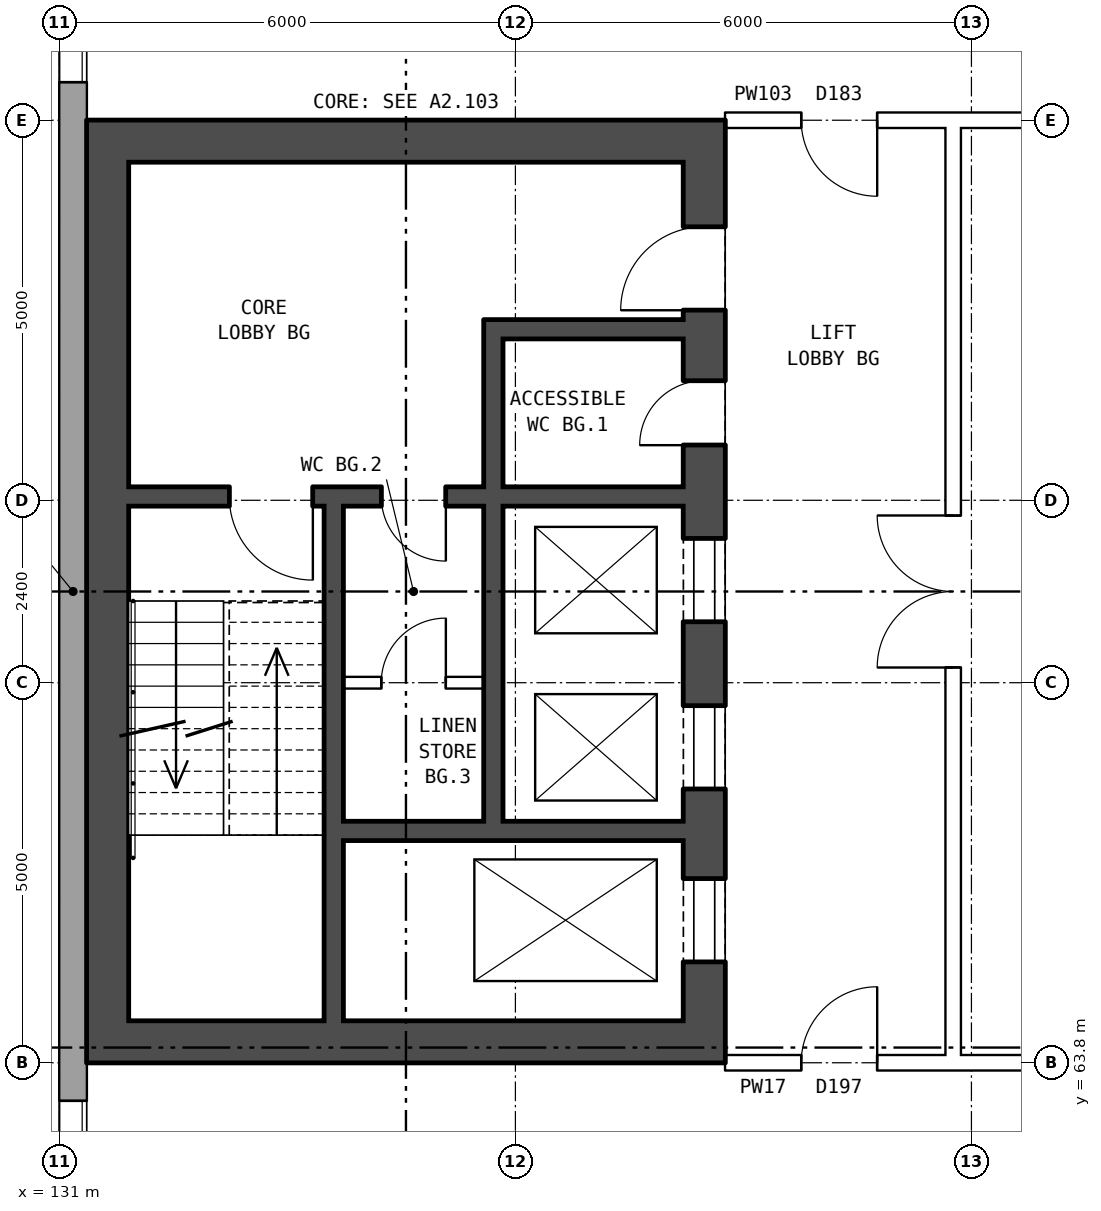
"""IFC4 building model, lengths in metres.
Left out: names, types, materials, properties, quantities, classifications, styles, units other than length and angle.
Written with IfcOpenShell. Run it as: python <this file> out.ifc"""

import sys

from ifc_helpers import new_model, si_unit, direction, frame, frame_2d, origin, place, context, subcontext, project, spatial, rectangle, extrude, element, fill, save


model = new_model("IFC4")
c1 = context("Model", 3, precision=1e-05, world=origin(), true_north=direction((0.0, 1.0)))
c2 = subcontext(c1, "Body", "Model", "MODEL_VIEW")
j1 = project(units=[si_unit("LENGTHUNIT", "METRE"), si_unit("PLANEANGLEUNIT", "RADIAN")], contexts=[c1])
p1 = place(None, origin())
s1 = spatial("IfcSite", under=j1, at=p1, CompositionType="ELEMENT")
p2 = place(p1, origin())
s2 = spatial("IfcBuilding", under=s1, at=p2, CompositionType="ELEMENT")
p3 = place(p2, frame((0.0, 0.0, 119.5)))
s3 = spatial("IfcBuildingStorey", under=s2, at=p3, CompositionType="ELEMENT", Elevation=119.5)
p4 = place(p3, frame((131.18, 82.925, 0.0), z_axis=(0.0, 0.0, 1.0), x_axis=(0.0, -1.0, 0.0)))
e1 = element("IfcWall", 1, at=p4, inside=s3, PredefinedType="STANDARD", context=c2, shape_type="SweptSolid", body=[
    extrude(rectangle(XDim=25.851, YDim=0.36, at=frame_2d((12.925, 0.0))), origin(), (0.0, 0.0, 1.0), 3.6),
])
p5 = place(p4, frame((1.625, 0.0, 0.8)))
e2 = element("IfcOpeningElement", 2, at=p5, cuts=e1, PredefinedType="OPENING", context=c2, shape_type="SweptSolid", body=[
    extrude(rectangle(XDim=1.6, YDim=1.8, at=frame_2d((0.8, 0.9))), frame((0.0, 0.19, 0.0), z_axis=(0.0, -1.0, 0.0), x_axis=(1.0, 0.0, 0.0)), (0.0, 0.0, 1.0), 0.38),
])
p6 = place(p4, frame((4.625, 0.0, 0.8)))
e3 = element("IfcOpeningElement", 3, at=p6, cuts=e1, PredefinedType="OPENING", context=c2, shape_type="SweptSolid", body=[
    extrude(rectangle(XDim=1.6, YDim=1.8, at=frame_2d((0.8, 0.9))), frame((0.0, 0.19, 0.0), z_axis=(0.0, -1.0, 0.0), x_axis=(1.0, 0.0, 0.0)), (0.0, 0.0, 1.0), 0.38),
])
p7 = place(p4, frame((19.625, 0.0, 0.8)))
e4 = element("IfcOpeningElement", 4, at=p7, cuts=e1, PredefinedType="OPENING", context=c2, shape_type="SweptSolid", body=[
    extrude(rectangle(XDim=1.6, YDim=1.8, at=frame_2d((0.8, 0.9))), frame((0.0, 0.19, 0.0), z_axis=(0.0, -1.0, 0.0), x_axis=(1.0, 0.0, 0.0)), (0.0, 0.0, 1.0), 0.38),
])
p8 = place(p4, frame((22.625, 0.0, 0.8)))
e5 = element("IfcOpeningElement", 5, at=p8, cuts=e1, PredefinedType="OPENING", context=c2, shape_type="SweptSolid", body=[
    extrude(rectangle(XDim=1.6, YDim=1.8, at=frame_2d((0.8, 0.9))), frame((0.0, 0.19, 0.0), z_axis=(0.0, -1.0, 0.0), x_axis=(1.0, 0.0, 0.0)), (0.0, 0.0, 1.0), 0.38),
])
p9 = place(p3, frame((139.485, 63.8, 0.0), z_axis=(0.0, 0.0, 1.0), x_axis=(0.0, 1.0, 0.0)))
e6 = element("IfcWall", 6, at=p9, inside=s3, PredefinedType="SHEAR", context=c2, shape_type="SweptSolid", body=[
    extrude(rectangle(XDim=12.4, YDim=0.55, at=frame_2d((6.2, 0.0))), origin(), (0.0, 0.0, 1.0), 3.6),
])
p10 = place(p9, frame((1.325, 0.0, 0.0)))
e7 = element("IfcOpeningElement", 7, at=p10, cuts=e6, PredefinedType="OPENING", context=c2, shape_type="SweptSolid", body=[
    extrude(rectangle(XDim=1.1, YDim=2.1, at=frame_2d((0.55, 1.05))), frame((0.0, 0.285, 0.0), z_axis=(0.0, -1.0, 0.0), x_axis=(1.0, 0.0, 0.0)), (0.0, 0.0, 1.0), 0.57),
])
p11 = place(p9, frame((3.6, 0.0, 0.0)))
e8 = element("IfcOpeningElement", 8, at=p11, cuts=e6, PredefinedType="OPENING", context=c2, shape_type="SweptSolid", body=[
    extrude(rectangle(XDim=1.1, YDim=2.1, at=frame_2d((0.55, 1.05))), frame((0.0, 0.285, 0.0), z_axis=(0.0, -1.0, 0.0), x_axis=(1.0, 0.0, 0.0)), (0.0, 0.0, 1.0), 0.57),
])
p12 = place(p9, frame((5.8, 0.0, 0.0)))
e9 = element("IfcOpeningElement", 9, at=p12, cuts=e6, PredefinedType="OPENING", context=c2, shape_type="SweptSolid", body=[
    extrude(rectangle(XDim=1.1, YDim=2.1, at=frame_2d((0.55, 1.05))), frame((0.0, 0.285, 0.0), z_axis=(0.0, -1.0, 0.0), x_axis=(1.0, 0.0, 0.0)), (0.0, 0.0, 1.0), 0.57),
])
p13 = place(p9, frame((9.9, 0.0, 0.0)))
e10 = element("IfcOpeningElement", 10, at=p13, cuts=e6, PredefinedType="OPENING", context=c2, shape_type="SweptSolid", body=[
    extrude(rectangle(XDim=1.1, YDim=2.1, at=frame_2d((0.55, 1.05))), frame((0.0, 0.285, 0.0), z_axis=(0.0, -1.0, 0.0), x_axis=(1.0, 0.0, 0.0)), (0.0, 0.0, 1.0), 0.57),
])
p14 = place(p9, frame((8.125, 0.0, 0.0)))
e11 = element("IfcOpeningElement", 11, at=p14, cuts=e6, PredefinedType="OPENING", context=c2, shape_type="SweptSolid", body=[
    extrude(rectangle(XDim=0.85, YDim=2.1, at=frame_2d((0.425, 1.05))), frame((0.0, 0.285, 0.0), z_axis=(0.0, -1.0, 0.0), x_axis=(1.0, 0.0, 0.0)), (0.0, 0.0, 1.0), 0.57),
])
p15 = place(p3, frame((131.635, 63.8, 0.0), z_axis=(0.0, 0.0, 1.0), x_axis=(0.0, 1.0, 0.0)))
e12 = element("IfcWall", 12, at=p15, inside=s3, PredefinedType="SHEAR", context=c2, shape_type="SweptSolid", body=[
    extrude(rectangle(XDim=12.4, YDim=0.55, at=frame_2d((6.2, 0.0))), origin(), (0.0, 0.0, 1.0), 3.6),
])
for number, where, z_axis, x_axis in (
    (13, (139.21, 64.075, 0.0), (0.0, 0.0, 1.0), (-1.0, 0.0, 0.0)),
    (14, (139.21, 75.925, 0.0), (0.0, 0.0, 1.0), (-1.0, 0.0, 0.0)),
):
    element("IfcWall", number, at=place(p3, frame(where, z_axis=z_axis, x_axis=x_axis)), inside=s3, PredefinedType="SHEAR", context=c2, shape_type="SweptSolid", body=[
        extrude(rectangle(XDim=7.3, YDim=0.55, at=frame_2d((3.65, 0.0))), origin(), (0.0, 0.0, 1.0), 3.6),
    ])
p16 = place(p3, frame((139.21, 66.85, 0.0), z_axis=(0.0, 0.0, 1.0), x_axis=(-1.0, 0.0, 0.0)))
e15 = element("IfcWall", 15, at=p16, inside=s3, PredefinedType="SHEAR", context=c2, shape_type="SweptSolid", body=[
    extrude(rectangle(XDim=4.475, YDim=0.25, at=frame_2d((2.237, 0.0))), origin(), (0.0, 0.0, 1.0), 3.6),
])
p17 = place(p3, frame((136.585, 68.8, 0.0), z_axis=(0.0, 0.0, 1.0), x_axis=(-1.0, 0.0, 0.0)))
e16 = element("IfcWall", 16, at=p17, inside=s3, PredefinedType="PARTITIONING", context=c2, shape_type="SweptSolid", body=[
    extrude(rectangle(XDim=1.85, YDim=0.15, at=frame_2d((0.925, 0.0))), origin(), (0.0, 0.0, 1.0), 3.6),
])
p18 = place(p17, frame((0.5, 0.0, 0.0)))
e17 = element("IfcOpeningElement", 17, at=p18, cuts=e16, PredefinedType="OPENING", context=c2, shape_type="SweptSolid", body=[
    extrude(rectangle(XDim=0.85, YDim=2.1, at=frame_2d((0.425, 1.05))), frame((0.0, 0.085, 0.0), z_axis=(0.0, -1.0, 0.0), x_axis=(1.0, 0.0, 0.0)), (0.0, 0.0, 1.0), 0.17),
])
p19 = place(p3, frame((139.21, 71.25, 0.0), z_axis=(0.0, 0.0, 1.0), x_axis=(-1.0, 0.0, 0.0)))
e18 = element("IfcWall", 18, at=p19, inside=s3, PredefinedType="SHEAR", context=c2, shape_type="SweptSolid", body=[
    extrude(rectangle(XDim=7.3, YDim=0.25, at=frame_2d((3.65, 0.0))), origin(), (0.0, 0.0, 1.0), 3.6),
])
p20 = place(p19, frame((4.875, 0.0, 0.0)))
e19 = element("IfcOpeningElement", 19, at=p20, cuts=e18, PredefinedType="OPENING", context=c2, shape_type="SweptSolid", body=[
    extrude(rectangle(XDim=1.1, YDim=2.1, at=frame_2d((0.55, 1.05))), frame((0.0, 0.135, 0.0), z_axis=(0.0, -1.0, 0.0), x_axis=(1.0, 0.0, 0.0)), (0.0, 0.0, 1.0), 0.27),
])
p21 = place(p19, frame((3.125, 0.0, 0.0)))
e20 = element("IfcOpeningElement", 20, at=p21, cuts=e18, PredefinedType="OPENING", context=c2, shape_type="SweptSolid", body=[
    extrude(rectangle(XDim=0.85, YDim=2.1, at=frame_2d((0.425, 1.05))), frame((0.0, 0.135, 0.0), z_axis=(0.0, -1.0, 0.0), x_axis=(1.0, 0.0, 0.0)), (0.0, 0.0, 1.0), 0.27),
])
p22 = place(p3, frame((139.21, 73.45, 0.0), z_axis=(0.0, 0.0, 1.0), x_axis=(-1.0, 0.0, 0.0)))
e21 = element("IfcWall", 21, at=p22, inside=s3, PredefinedType="SHEAR", context=c2, shape_type="SweptSolid", body=[
    extrude(rectangle(XDim=2.375, YDim=0.25, at=frame_2d((1.188, 0.0))), origin(), (0.0, 0.0, 1.0), 3.6),
])
p23 = place(p3, frame((136.71, 66.975, 0.0), z_axis=(0.0, 0.0, 1.0), x_axis=(0.0, 1.0, 0.0)))
e22 = element("IfcWall", 22, at=p23, inside=s3, PredefinedType="SHEAR", context=c2, shape_type="SweptSolid", body=[
    extrude(rectangle(XDim=4.15, YDim=0.25, at=frame_2d((2.075, 0.0))), origin(), (0.0, 0.0, 1.0), 3.6),
])
p24 = place(p3, frame((136.71, 71.375, 0.0), z_axis=(0.0, 0.0, 1.0), x_axis=(0.0, 1.0, 0.0)))
e23 = element("IfcWall", 23, at=p24, inside=s3, PredefinedType="SHEAR", context=c2, shape_type="SweptSolid", body=[
    extrude(rectangle(XDim=2.2, YDim=0.25, at=frame_2d((1.1, 0.0))), origin(), (0.0, 0.0, 1.0), 3.6),
])
p25 = place(p3, frame((134.61, 64.35, 0.0), z_axis=(0.0, 0.0, 1.0), x_axis=(0.0, 1.0, 0.0)))
e24 = element("IfcWall", 24, at=p25, inside=s3, PredefinedType="SHEAR", context=c2, shape_type="SweptSolid", body=[
    extrude(rectangle(XDim=6.775, YDim=0.25, at=frame_2d((3.387, 0.0))), origin(), (0.0, 0.0, 1.0), 3.6),
])
p26 = place(p3, frame((142.76, 63.9, 0.0), z_axis=(0.0, 0.0, 1.0), x_axis=(0.0, 1.0, 0.0)))
e25 = element("IfcWall", 25, at=p26, inside=s3, PredefinedType="PARTITIONING", context=c2, shape_type="SweptSolid", body=[
    extrude(rectangle(XDim=12.2, YDim=0.2, at=frame_2d((6.1, 0.0))), origin(), (0.0, 0.0, 1.0), 3.6),
])
p27 = place(p26, frame((5.1, 0.0, 0.0)))
e26 = element("IfcOpeningElement", 26, at=p27, cuts=e25, PredefinedType="OPENING", context=c2, shape_type="SweptSolid", body=[
    extrude(rectangle(XDim=2.0, YDim=2.1, at=frame_2d((1.0, 1.05))), frame((0.0, 0.11, 0.0), z_axis=(0.0, -1.0, 0.0), x_axis=(1.0, 0.0, 0.0)), (0.0, 0.0, 1.0), 0.22),
])
p28 = place(p3, frame((142.76, 63.8, 0.0), z_axis=(0.0, 0.0, 1.0), x_axis=(1.0, 0.0, 0.0)))
e27 = element("IfcWall", 27, at=p28, inside=s3, PredefinedType="PARTITIONING", context=c2, shape_type="SweptSolid", body=[
    extrude(rectangle(XDim=14.48, YDim=0.2, at=frame_2d((7.24, 0.0))), origin(), (0.0, 0.0, 1.0), 3.6),
])
p29 = place(p28, frame((6.34, 0.0, 0.0)))
e28 = element("IfcOpeningElement", 28, at=p29, cuts=e27, PredefinedType="OPENING", context=c2, shape_type="SweptSolid", body=[
    extrude(rectangle(XDim=1.8, YDim=2.1, at=frame_2d((0.9, 1.05))), frame((0.0, 0.11, 0.0), z_axis=(0.0, -1.0, 0.0), x_axis=(1.0, 0.0, 0.0)), (0.0, 0.0, 1.0), 0.22),
])
p30 = place(p3, frame((139.76, 63.8, 0.0), z_axis=(0.0, 0.0, 1.0), x_axis=(1.0, 0.0, 0.0)))
e29 = element("IfcWall", 29, at=p30, inside=s3, PredefinedType="PARTITIONING", context=c2, shape_type="SweptSolid", body=[
    extrude(rectangle(XDim=3.0, YDim=0.2, at=frame_2d((1.5, 0.0))), origin(), (0.0, 0.0, 1.0), 3.6),
])
p31 = place(p30, frame((1.0, 0.0, 0.0)))
e30 = element("IfcOpeningElement", 30, at=p31, cuts=e29, PredefinedType="OPENING", context=c2, shape_type="SweptSolid", body=[
    extrude(rectangle(XDim=1.0, YDim=2.1, at=frame_2d((0.5, 1.05))), frame((0.0, 0.11, 0.0), z_axis=(0.0, -1.0, 0.0), x_axis=(1.0, 0.0, 0.0)), (0.0, 0.0, 1.0), 0.22),
])
p32 = place(p3, frame((142.76, 76.2, 0.0), z_axis=(0.0, 0.0, 1.0), x_axis=(1.0, 0.0, 0.0)))
e31 = element("IfcWall", 31, at=p32, inside=s3, PredefinedType="PARTITIONING", context=c2, shape_type="SweptSolid", body=[
    extrude(rectangle(XDim=14.48, YDim=0.2, at=frame_2d((7.24, 0.0))), origin(), (0.0, 0.0, 1.0), 3.6),
])
p33 = place(p32, frame((6.34, 0.0, 0.0)))
e32 = element("IfcOpeningElement", 32, at=p33, cuts=e31, PredefinedType="OPENING", context=c2, shape_type="SweptSolid", body=[
    extrude(rectangle(XDim=1.8, YDim=2.1, at=frame_2d((0.9, 1.05))), frame((0.0, 0.11, 0.0), z_axis=(0.0, -1.0, 0.0), x_axis=(1.0, 0.0, 0.0)), (0.0, 0.0, 1.0), 0.22),
])
p34 = place(p3, frame((139.76, 76.2, 0.0), z_axis=(0.0, 0.0, 1.0), x_axis=(1.0, 0.0, 0.0)))
e33 = element("IfcWall", 33, at=p34, inside=s3, PredefinedType="PARTITIONING", context=c2, shape_type="SweptSolid", body=[
    extrude(rectangle(XDim=3.0, YDim=0.2, at=frame_2d((1.5, 0.0))), origin(), (0.0, 0.0, 1.0), 3.6),
])
p35 = place(p34, frame((1.0, 0.0, 0.0)))
e34 = element("IfcOpeningElement", 34, at=p35, cuts=e33, PredefinedType="OPENING", context=c2, shape_type="SweptSolid", body=[
    extrude(rectangle(XDim=1.0, YDim=2.1, at=frame_2d((0.5, 1.05))), frame((0.0, 0.11, 0.0), z_axis=(0.0, -1.0, 0.0), x_axis=(1.0, 0.0, 0.0)), (0.0, 0.0, 1.0), 0.22),
])
p36 = place(p6, origin())
e35 = element("IfcWindow", 35, at=p36, inside=s3, PartitioningType="SINGLE_PANEL", PredefinedType="WINDOW", context=c2, shape_type="SweptSolid", body=[
    extrude(rectangle(XDim=1.6, YDim=1.8, at=frame_2d((0.8, 0.9))), frame((0.0, 0.15, 0.0), z_axis=(0.0, -1.0, 0.0), x_axis=(1.0, 0.0, 0.0)), (0.0, 0.0, 1.0), 0.06),
])
fill(e3, e35)
p37 = place(p7, origin())
e36 = element("IfcWindow", 36, at=p37, inside=s3, PartitioningType="SINGLE_PANEL", PredefinedType="WINDOW", context=c2, shape_type="SweptSolid", body=[
    extrude(rectangle(XDim=1.6, YDim=1.8, at=frame_2d((0.8, 0.9))), frame((0.0, 0.15, 0.0), z_axis=(0.0, -1.0, 0.0), x_axis=(1.0, 0.0, 0.0)), (0.0, 0.0, 1.0), 0.06),
])
fill(e4, e36)
p38 = place(p10, origin())
e37 = element("IfcDoor", 37, at=p38, inside=s3, OperationType="DOUBLE_DOOR_SLIDING", PredefinedType="DOOR", context=c2, shape_type="SweptSolid", body=[
    extrude(rectangle(XDim=1.1, YDim=2.1, at=frame_2d((0.55, 1.05))), frame((0.0, 0.26, 0.0), z_axis=(0.0, -1.0, 0.0), x_axis=(1.0, 0.0, 0.0)), (0.0, 0.0, 1.0), 0.05),
])
fill(e7, e37)
p39 = place(p11, origin())
e38 = element("IfcDoor", 38, at=p39, inside=s3, OperationType="DOUBLE_DOOR_SLIDING", PredefinedType="DOOR", context=c2, shape_type="SweptSolid", body=[
    extrude(rectangle(XDim=1.1, YDim=2.1, at=frame_2d((0.55, 1.05))), frame((0.0, 0.26, 0.0), z_axis=(0.0, -1.0, 0.0), x_axis=(1.0, 0.0, 0.0)), (0.0, 0.0, 1.0), 0.05),
])
fill(e8, e38)
p40 = place(p12, origin())
e39 = element("IfcDoor", 39, at=p40, inside=s3, OperationType="DOUBLE_DOOR_SLIDING", PredefinedType="DOOR", context=c2, shape_type="SweptSolid", body=[
    extrude(rectangle(XDim=1.1, YDim=2.1, at=frame_2d((0.55, 1.05))), frame((0.0, 0.26, 0.0), z_axis=(0.0, -1.0, 0.0), x_axis=(1.0, 0.0, 0.0)), (0.0, 0.0, 1.0), 0.05),
])
fill(e9, e39)
p41 = place(p13, origin())
e40 = element("IfcDoor", 40, at=p41, inside=s3, OperationType="SINGLE_SWING_LEFT", PredefinedType="DOOR", context=c2, shape_type="SweptSolid", body=[
    extrude(rectangle(XDim=1.1, YDim=2.1, at=frame_2d((0.55, 1.05))), frame((0.0, 0.26, 0.0), z_axis=(0.0, -1.0, 0.0), x_axis=(1.0, 0.0, 0.0)), (0.0, 0.0, 1.0), 0.05),
])
fill(e10, e40)
p42 = place(p20, origin())
e41 = element("IfcDoor", 41, at=p42, inside=s3, OperationType="SINGLE_SWING_LEFT", PredefinedType="DOOR", context=c2, shape_type="SweptSolid", body=[
    extrude(rectangle(XDim=1.1, YDim=2.1, at=frame_2d((0.55, 1.05))), frame((0.0, 0.025, 0.0), z_axis=(0.0, -1.0, 0.0), x_axis=(1.0, 0.0, 0.0)), (0.0, 0.0, 1.0), 0.05),
])
fill(e19, e41)
p43 = place(p14, origin())
e42 = element("IfcDoor", 42, at=p43, inside=s3, OperationType="SINGLE_SWING_LEFT", PredefinedType="DOOR", context=c2, shape_type="SweptSolid", body=[
    extrude(rectangle(XDim=0.85, YDim=2.1, at=frame_2d((0.425, 1.05))), frame((0.0, 0.26, 0.0), z_axis=(0.0, -1.0, 0.0), x_axis=(1.0, 0.0, 0.0)), (0.0, 0.0, 1.0), 0.05),
])
fill(e11, e42)
p44 = place(p21, origin())
e43 = element("IfcDoor", 43, at=p44, inside=s3, OperationType="SINGLE_SWING_LEFT", PredefinedType="DOOR", context=c2, shape_type="SweptSolid", body=[
    extrude(rectangle(XDim=0.85, YDim=2.1, at=frame_2d((0.425, 1.05))), frame((0.0, 0.025, 0.0), z_axis=(0.0, -1.0, 0.0), x_axis=(1.0, 0.0, 0.0)), (0.0, 0.0, 1.0), 0.05),
])
fill(e20, e43)
p45 = place(p18, frame((0.85, 0.0, 0.0), z_axis=(0.0, 0.0, 1.0), x_axis=(-1.0, 0.0, 0.0)))
e44 = element("IfcDoor", 44, at=p45, inside=s3, OperationType="SINGLE_SWING_RIGHT", PredefinedType="DOOR", context=c2, shape_type="SweptSolid", body=[
    extrude(rectangle(XDim=0.85, YDim=2.1, at=frame_2d((0.425, 1.05))), frame((0.0, 0.025, 0.0), z_axis=(0.0, -1.0, 0.0), x_axis=(1.0, 0.0, 0.0)), (0.0, 0.0, 1.0), 0.05),
])
fill(e17, e44)
p46 = place(p27, origin())
e45 = element("IfcDoor", 45, at=p46, inside=s3, OperationType="DOUBLE_DOOR_SINGLE_SWING", PredefinedType="DOOR", context=c2, shape_type="SweptSolid", body=[
    extrude(rectangle(XDim=2.0, YDim=2.1, at=frame_2d((1.0, 1.05))), frame((0.0, 0.025, 0.0), z_axis=(0.0, -1.0, 0.0), x_axis=(1.0, 0.0, 0.0)), (0.0, 0.0, 1.0), 0.05),
])
fill(e26, e45)
p47 = place(p31, origin())
e46 = element("IfcDoor", 46, at=p47, inside=s3, OperationType="SINGLE_SWING_RIGHT", PredefinedType="DOOR", context=c2, shape_type="SweptSolid", body=[
    extrude(rectangle(XDim=1.0, YDim=2.1, at=frame_2d((0.5, 1.05))), frame((0.0, 0.025, 0.0), z_axis=(0.0, -1.0, 0.0), x_axis=(1.0, 0.0, 0.0)), (0.0, 0.0, 1.0), 0.05),
])
fill(e30, e46)
p48 = place(p35, frame((1.0, 0.0, 0.0), z_axis=(0.0, 0.0, 1.0), x_axis=(-1.0, 0.0, 0.0)))
e47 = element("IfcDoor", 47, at=p48, inside=s3, OperationType="SINGLE_SWING_LEFT", PredefinedType="DOOR", context=c2, shape_type="SweptSolid", body=[
    extrude(rectangle(XDim=1.0, YDim=2.1, at=frame_2d((0.5, 1.05))), frame((0.0, 0.025, 0.0), z_axis=(0.0, -1.0, 0.0), x_axis=(1.0, 0.0, 0.0)), (0.0, 0.0, 1.0), 0.05),
])
fill(e34, e47)
save(model, sys.argv[1])
